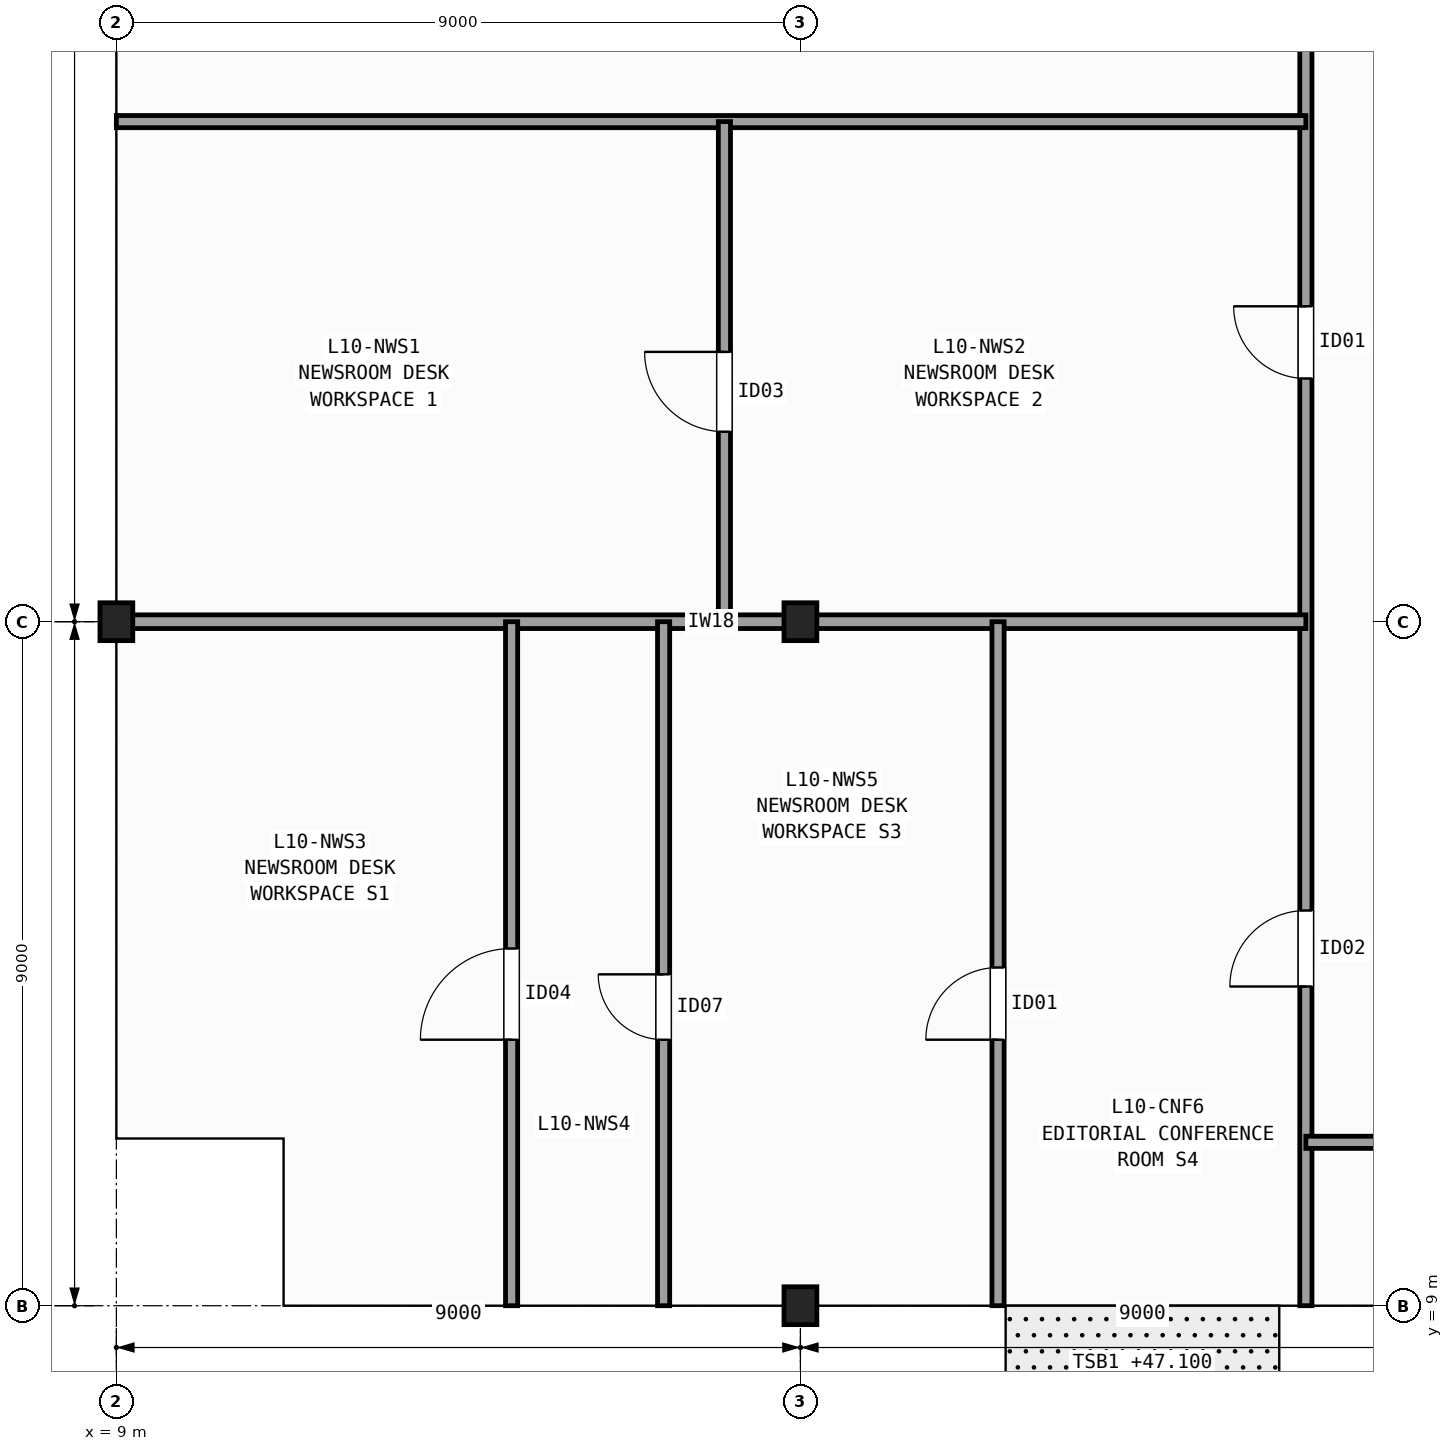
"""IFC4 building model, lengths in metres.
Left out: names, types, materials, properties, quantities, classifications, styles, units other than length and angle.
Written with IfcOpenShell. Run it as: python <this file> out.ifc"""

import sys

from ifc_helpers import new_model, si_unit, direction, frame, frame_2d, origin, origin_2d, place, context, subcontext, project, spatial, rectangle, i_section, extrude, element, fill, save


model = new_model("IFC4")
c1 = context("Model", 3, precision=1e-05, world=origin(), true_north=direction((0.0, 1.0)))
c2 = subcontext(c1, "Body", "Model", "MODEL_VIEW")
j1 = project(units=[si_unit("LENGTHUNIT", "METRE"), si_unit("PLANEANGLEUNIT", "RADIAN")], contexts=[c1])
p1 = place(None, origin())
s1 = spatial("IfcSite", under=j1, at=p1, CompositionType="ELEMENT")
p2 = place(p1, origin())
s2 = spatial("IfcBuilding", under=s1, at=p2, CompositionType="ELEMENT")
p3 = place(p2, frame((0.0, 0.0, 47.1)))
s3 = spatial("IfcBuildingStorey", under=s2, at=p3, CompositionType="ELEMENT", Elevation=47.1)
for number, where, z_axis, x_axis in (
    (1, (9.0, 18.0, 0.0), (0.0, 0.0, 1.0), (1.0, 0.0, 0.0)),
    (2, (18.0, 9.0, 0.0), (0.0, 0.0, 1.0), (1.0, 0.0, 0.0)),
    (3, (18.0, 18.0, 0.0), (0.0, 0.0, 1.0), (1.0, 0.0, 0.0)),
):
    element("IfcColumn", number, at=place(p3, frame(where, z_axis=z_axis, x_axis=x_axis)), inside=s3, PredefinedType="COLUMN", context=c2, shape_type="SweptSolid", body=[
        extrude(i_section(OverallWidth=0.432, OverallDepth=0.498, WebThickness=0.056, FlangeThickness=0.089, FilletRadius=0.015, at=origin_2d()), origin(), (0.0, 0.0, 1.0), 3.7),
    ])
p4 = place(p3, frame((24.65, 9.0, 0.0), z_axis=(0.0, 0.0, 1.0), x_axis=(0.0, 1.0, 0.0)))
e4 = element("IfcWall", 4, at=p4, inside=s3, PredefinedType="PARTITIONING", context=c2, shape_type="SweptSolid", body=[
    extrude(rectangle(XDim=19.2, YDim=0.16, at=frame_2d((9.6, 0.0))), origin(), (0.0, 0.0, 1.0), 2.627),
])
p5 = place(p4, frame((12.2, 0.0, 0.0)))
e5 = element("IfcOpeningElement", 5, at=p5, cuts=e4, PredefinedType="OPENING", context=c2, shape_type="SweptSolid", body=[
    extrude(rectangle(XDim=0.95, YDim=2.1, at=frame_2d((0.475, 1.05))), frame((0.0, 0.09, 0.0), z_axis=(0.0, -1.0, 0.0), x_axis=(1.0, 0.0, 0.0)), (0.0, 0.0, 1.0), 0.18),
])
p6 = place(p4, frame((4.2, 0.0, 0.0)))
e6 = element("IfcOpeningElement", 6, at=p6, cuts=e4, PredefinedType="OPENING", context=c2, shape_type="SweptSolid", body=[
    extrude(rectangle(XDim=1.0, YDim=2.1, at=frame_2d((0.5, 1.05))), frame((0.0, 0.09, 0.0), z_axis=(0.0, -1.0, 0.0), x_axis=(1.0, 0.0, 0.0)), (0.0, 0.0, 1.0), 0.18),
])
p7 = place(p3, frame((9.0, 24.58, 0.0), z_axis=(0.0, 0.0, 1.0), x_axis=(1.0, 0.0, 0.0)))
e7 = element("IfcWall", 7, at=p7, inside=s3, PredefinedType="PARTITIONING", context=c2, shape_type="SweptSolid", body=[
    extrude(rectangle(XDim=15.65, YDim=0.16, at=frame_2d((7.825, 0.0))), origin(), (0.0, 0.0, 1.0), 2.627),
])
p8 = place(p3, frame((9.0, 18.0, 0.0), z_axis=(0.0, 0.0, 1.0), x_axis=(1.0, 0.0, 0.0)))
e8 = element("IfcWall", 8, at=p8, inside=s3, PredefinedType="PARTITIONING", context=c2, shape_type="SweptSolid", body=[
    extrude(rectangle(XDim=15.65, YDim=0.18, at=frame_2d((7.825, 0.0))), origin(), (0.0, 0.0, 1.0), 2.627),
])
p9 = place(p3, frame((17.0, 18.0, 0.0), z_axis=(0.0, 0.0, 1.0), x_axis=(0.0, 1.0, 0.0)))
e9 = element("IfcWall", 9, at=p9, inside=s3, PredefinedType="PARTITIONING", context=c2, shape_type="SweptSolid", body=[
    extrude(rectangle(XDim=6.58, YDim=0.16, at=frame_2d((3.29, 0.0))), origin(), (0.0, 0.0, 1.0), 2.789),
])
p10 = place(p9, frame((2.5, 0.0, 0.0)))
e10 = element("IfcOpeningElement", 10, at=p10, cuts=e9, PredefinedType="OPENING", context=c2, shape_type="SweptSolid", body=[
    extrude(rectangle(XDim=1.05, YDim=2.15, at=frame_2d((0.525, 1.075))), frame((0.0, 0.09, 0.0), z_axis=(0.0, -1.0, 0.0), x_axis=(1.0, 0.0, 0.0)), (0.0, 0.0, 1.0), 0.18),
])
p11 = place(p3, frame((14.2, 9.0, 0.0), z_axis=(0.0, 0.0, 1.0), x_axis=(0.0, 1.0, 0.0)))
e11 = element("IfcWall", 11, at=p11, inside=s3, PredefinedType="PARTITIONING", context=c2, shape_type="SweptSolid", body=[
    extrude(rectangle(XDim=9.0, YDim=0.16, at=frame_2d((4.5, 0.0))), origin(), (0.0, 0.0, 1.0), 2.789),
])
p12 = place(p11, frame((3.5, 0.0, 0.0)))
e12 = element("IfcOpeningElement", 12, at=p12, cuts=e11, PredefinedType="OPENING", context=c2, shape_type="SweptSolid", body=[
    extrude(rectangle(XDim=1.2, YDim=2.15, at=frame_2d((0.6, 1.075))), frame((0.0, 0.09, 0.0), z_axis=(0.0, -1.0, 0.0), x_axis=(1.0, 0.0, 0.0)), (0.0, 0.0, 1.0), 0.18),
])
p13 = place(p3, frame((16.2, 9.0, 0.0), z_axis=(0.0, 0.0, 1.0), x_axis=(0.0, 1.0, 0.0)))
e13 = element("IfcWall", 13, at=p13, inside=s3, PredefinedType="PARTITIONING", context=c2, shape_type="SweptSolid", body=[
    extrude(rectangle(XDim=9.0, YDim=0.16, at=frame_2d((4.5, 0.0))), origin(), (0.0, 0.0, 1.0), 2.789),
])
p14 = place(p13, frame((3.5, 0.0, 0.0)))
e14 = element("IfcOpeningElement", 14, at=p14, cuts=e13, PredefinedType="OPENING", context=c2, shape_type="SweptSolid", body=[
    extrude(rectangle(XDim=0.86, YDim=2.05, at=frame_2d((0.43, 1.025))), frame((0.0, 0.09, 0.0), z_axis=(0.0, -1.0, 0.0), x_axis=(1.0, 0.0, 0.0)), (0.0, 0.0, 1.0), 0.18),
])
p15 = place(p3, frame((20.6, 9.0, 0.0), z_axis=(0.0, 0.0, 1.0), x_axis=(0.0, 1.0, 0.0)))
e15 = element("IfcWall", 15, at=p15, inside=s3, PredefinedType="PARTITIONING", context=c2, shape_type="SweptSolid", body=[
    extrude(rectangle(XDim=9.0, YDim=0.16, at=frame_2d((4.5, 0.0))), origin(), (0.0, 0.0, 1.0), 2.627),
])
p16 = place(p15, frame((3.5, 0.0, 0.0)))
e16 = element("IfcOpeningElement", 16, at=p16, cuts=e15, PredefinedType="OPENING", context=c2, shape_type="SweptSolid", body=[
    extrude(rectangle(XDim=0.95, YDim=2.1, at=frame_2d((0.475, 1.05))), frame((0.0, 0.09, 0.0), z_axis=(0.0, -1.0, 0.0), x_axis=(1.0, 0.0, 0.0)), (0.0, 0.0, 1.0), 0.18),
])
p17 = place(p3, frame((24.65, 11.15, 0.0), z_axis=(0.0, 0.0, 1.0), x_axis=(1.0, 0.0, 0.0)))
e17 = element("IfcWall", 17, at=p17, inside=s3, PredefinedType="PARTITIONING", context=c2, shape_type="SweptSolid", body=[
    extrude(rectangle(XDim=4.75, YDim=0.16, at=frame_2d((2.375, 0.0))), origin(), (0.0, 0.0, 1.0), 2.792),
])
p18 = place(p17, frame((1.2, 0.0, 0.0)))
e18 = element("IfcOpeningElement", 18, at=p18, cuts=e17, PredefinedType="OPENING", context=c2, shape_type="SweptSolid", body=[
    extrude(rectangle(XDim=0.86, YDim=2.05, at=frame_2d((0.43, 1.025))), frame((0.0, 0.09, 0.0), z_axis=(0.0, -1.0, 0.0), x_axis=(1.0, 0.0, 0.0)), (0.0, 0.0, 1.0), 0.18),
])
p19 = place(p5, origin())
e19 = element("IfcDoor", 19, at=p19, inside=s3, OperationType="SINGLE_SWING_RIGHT", PredefinedType="DOOR", context=c2, shape_type="SweptSolid", body=[
    extrude(rectangle(XDim=0.95, YDim=2.1, at=frame_2d((0.475, 1.05))), frame((0.0, 0.025, 0.0), z_axis=(0.0, -1.0, 0.0), x_axis=(1.0, 0.0, 0.0)), (0.0, 0.0, 1.0), 0.05),
])
fill(e5, e19)
p20 = place(p6, origin())
e20 = element("IfcDoor", 20, at=p20, inside=s3, OperationType="SINGLE_SWING_LEFT", PredefinedType="DOOR", context=c2, shape_type="SweptSolid", body=[
    extrude(rectangle(XDim=1.0, YDim=2.1, at=frame_2d((0.5, 1.05))), frame((0.0, 0.025, 0.0), z_axis=(0.0, -1.0, 0.0), x_axis=(1.0, 0.0, 0.0)), (0.0, 0.0, 1.0), 0.05),
])
fill(e6, e20)
p21 = place(p10, origin())
e21 = element("IfcDoor", 21, at=p21, inside=s3, OperationType="SINGLE_SWING_RIGHT", PredefinedType="DOOR", context=c2, shape_type="SweptSolid", body=[
    extrude(rectangle(XDim=1.05, YDim=2.15, at=frame_2d((0.525, 1.075))), frame((0.0, 0.025, 0.0), z_axis=(0.0, -1.0, 0.0), x_axis=(1.0, 0.0, 0.0)), (0.0, 0.0, 1.0), 0.05),
])
fill(e10, e21)
p22 = place(p12, origin())
e22 = element("IfcDoor", 22, at=p22, inside=s3, OperationType="SINGLE_SWING_LEFT", PredefinedType="DOOR", context=c2, shape_type="SweptSolid", body=[
    extrude(rectangle(XDim=1.2, YDim=2.15, at=frame_2d((0.6, 1.075))), frame((0.0, 0.025, 0.0), z_axis=(0.0, -1.0, 0.0), x_axis=(1.0, 0.0, 0.0)), (0.0, 0.0, 1.0), 0.05),
])
fill(e12, e22)
p23 = place(p14, origin())
e23 = element("IfcDoor", 23, at=p23, inside=s3, OperationType="SINGLE_SWING_RIGHT", PredefinedType="DOOR", context=c2, shape_type="SweptSolid", body=[
    extrude(rectangle(XDim=0.86, YDim=2.05, at=frame_2d((0.43, 1.025))), frame((0.0, 0.025, 0.0), z_axis=(0.0, -1.0, 0.0), x_axis=(1.0, 0.0, 0.0)), (0.0, 0.0, 1.0), 0.05),
])
fill(e14, e23)
p24 = place(p16, origin())
e24 = element("IfcDoor", 24, at=p24, inside=s3, OperationType="SINGLE_SWING_LEFT", PredefinedType="DOOR", context=c2, shape_type="SweptSolid", body=[
    extrude(rectangle(XDim=0.95, YDim=2.1, at=frame_2d((0.475, 1.05))), frame((0.0, 0.025, 0.0), z_axis=(0.0, -1.0, 0.0), x_axis=(1.0, 0.0, 0.0)), (0.0, 0.0, 1.0), 0.05),
])
fill(e16, e24)
save(model, sys.argv[1])
